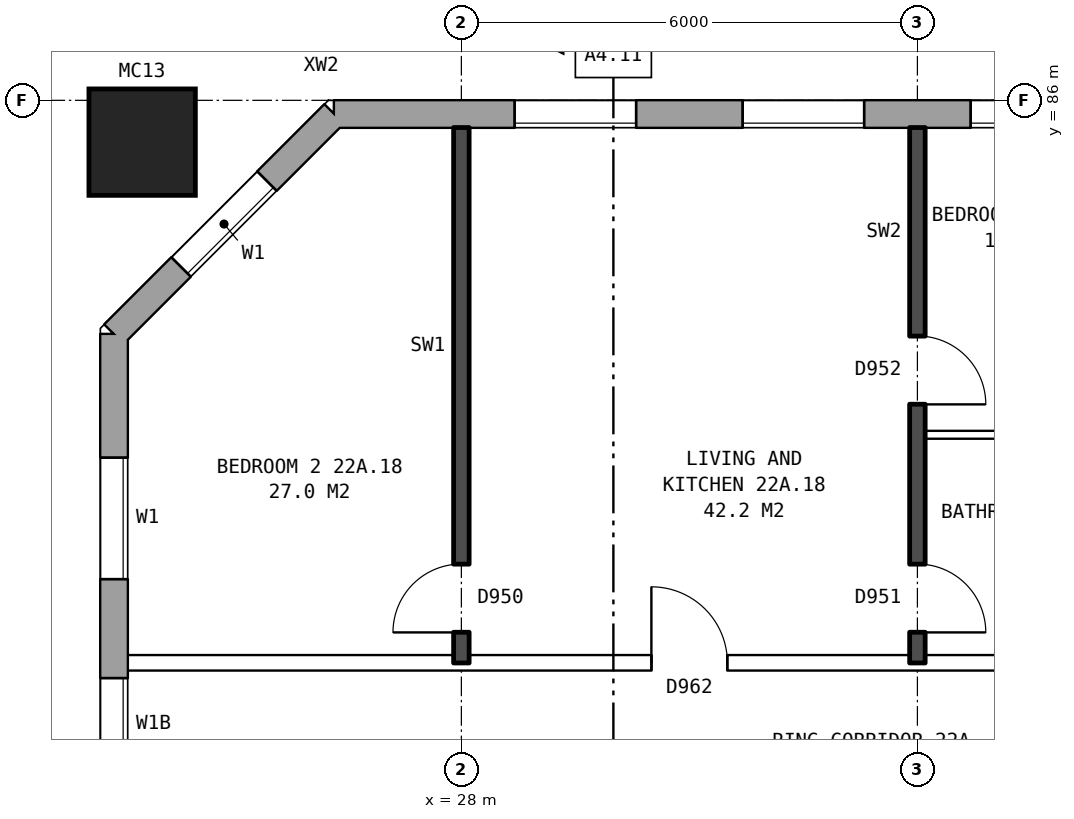
"""IFC4 building model, lengths in metres.
Left out: names, types, materials, properties, quantities, classifications, styles, units other than length and angle.
Written with IfcOpenShell. Run it as: python <this file> out.ifc"""

import sys

from ifc_helpers import new_model, si_unit, direction, frame, frame_2d, origin, origin_2d, place, context, subcontext, project, spatial, rectangle, hollow_rectangle, extrude, element, fill, save


model = new_model("IFC4")
c1 = context("Model", 3, precision=1e-05, world=origin(), true_north=direction((0.0, 1.0)))
c2 = subcontext(c1, "Body", "Model", "MODEL_VIEW")
j1 = project(units=[si_unit("LENGTHUNIT", "METRE"), si_unit("PLANEANGLEUNIT", "RADIAN")], contexts=[c1])
p1 = place(None, origin())
s1 = spatial("IfcSite", under=j1, at=p1, CompositionType="ELEMENT")
p2 = place(p1, origin())
s2 = spatial("IfcBuilding", under=s1, at=p2, CompositionType="ELEMENT")
p3 = place(p2, frame((0.0, 0.0, 80.9)))
s3 = spatial("IfcBuildingStorey", under=s2, at=p3, CompositionType="ELEMENT", Elevation=80.9)
p4 = place(p3, frame((23.8, 85.45, 0.0), z_axis=(0.0, 0.0, 1.0), x_axis=(1.0, 0.0, 0.0)))
e1 = element("IfcColumn", 1, at=p4, inside=s3, PredefinedType="COLUMN", context=c2, shape_type="SweptSolid", body=[
    extrude(hollow_rectangle(XDim=1.4, YDim=1.4, WallThickness=0.075, at=origin_2d()), origin(), (0.0, 0.0, 1.0), 3.1),
])
p5 = place(p3, frame((72.925, 85.82, 0.0), z_axis=(0.0, 0.0, 1.0), x_axis=(-1.0, 0.0, 0.0)))
e2 = element("IfcWall", 2, at=p5, inside=s3, PredefinedType="STANDARD", context=c2, shape_type="SweptSolid", body=[
    extrude(rectangle(XDim=46.601, YDim=0.36, at=frame_2d((23.3, 0.0))), origin(), (0.0, 0.0, 1.0), 2.85),
])
p6 = place(p5, frame((0.625, 0.0, 0.8)))
e3 = element("IfcOpeningElement", 3, at=p6, cuts=e2, PredefinedType="OPENING", context=c2, shape_type="SweptSolid", body=[
    extrude(rectangle(XDim=1.6, YDim=1.8, at=frame_2d((0.8, 0.9))), frame((0.0, 0.19, 0.0), z_axis=(0.0, -1.0, 0.0), x_axis=(1.0, 0.0, 0.0)), (0.0, 0.0, 1.0), 0.38),
])
p7 = place(p5, frame((3.625, 0.0, 0.8)))
e4 = element("IfcOpeningElement", 4, at=p7, cuts=e2, PredefinedType="OPENING", context=c2, shape_type="SweptSolid", body=[
    extrude(rectangle(XDim=1.6, YDim=1.8, at=frame_2d((0.8, 0.9))), frame((0.0, 0.19, 0.0), z_axis=(0.0, -1.0, 0.0), x_axis=(1.0, 0.0, 0.0)), (0.0, 0.0, 1.0), 0.38),
])
p8 = place(p5, frame((6.625, 0.0, 0.8)))
e5 = element("IfcOpeningElement", 5, at=p8, cuts=e2, PredefinedType="OPENING", context=c2, shape_type="SweptSolid", body=[
    extrude(rectangle(XDim=1.6, YDim=1.8, at=frame_2d((0.8, 0.9))), frame((0.0, 0.19, 0.0), z_axis=(0.0, -1.0, 0.0), x_axis=(1.0, 0.0, 0.0)), (0.0, 0.0, 1.0), 0.38),
])
p9 = place(p5, frame((9.625, 0.0, 0.8)))
e6 = element("IfcOpeningElement", 6, at=p9, cuts=e2, PredefinedType="OPENING", context=c2, shape_type="SweptSolid", body=[
    extrude(rectangle(XDim=1.6, YDim=1.8, at=frame_2d((0.8, 0.9))), frame((0.0, 0.19, 0.0), z_axis=(0.0, -1.0, 0.0), x_axis=(1.0, 0.0, 0.0)), (0.0, 0.0, 1.0), 0.38),
])
p10 = place(p5, frame((12.075, 0.0, 0.8)))
e7 = element("IfcOpeningElement", 7, at=p10, cuts=e2, PredefinedType="OPENING", context=c2, shape_type="SweptSolid", body=[
    extrude(rectangle(XDim=1.0, YDim=1.8, at=frame_2d((0.5, 0.9))), frame((0.0, 0.19, 0.0), z_axis=(0.0, -1.0, 0.0), x_axis=(1.0, 0.0, 0.0)), (0.0, 0.0, 1.0), 0.38),
])
p11 = place(p5, frame((15.325, 0.0, 0.65)))
e8 = element("IfcOpeningElement", 8, at=p11, cuts=e2, PredefinedType="OPENING", context=c2, shape_type="SweptSolid", body=[
    extrude(rectangle(XDim=0.6, YDim=0.9, at=frame_2d((0.3, 0.45))), frame((0.0, 0.19, 0.0), z_axis=(0.0, -1.0, 0.0), x_axis=(1.0, 0.0, 0.0)), (0.0, 0.0, 1.0), 0.38),
])
p12 = place(p5, frame((18.625, 0.0, 0.8)))
e9 = element("IfcOpeningElement", 9, at=p12, cuts=e2, PredefinedType="OPENING", context=c2, shape_type="SweptSolid", body=[
    extrude(rectangle(XDim=1.6, YDim=1.8, at=frame_2d((0.8, 0.9))), frame((0.0, 0.19, 0.0), z_axis=(0.0, -1.0, 0.0), x_axis=(1.0, 0.0, 0.0)), (0.0, 0.0, 1.0), 0.38),
])
p13 = place(p5, frame((21.625, 0.0, 0.8)))
e10 = element("IfcOpeningElement", 10, at=p13, cuts=e2, PredefinedType="OPENING", context=c2, shape_type="SweptSolid", body=[
    extrude(rectangle(XDim=1.6, YDim=1.8, at=frame_2d((0.8, 0.9))), frame((0.0, 0.19, 0.0), z_axis=(0.0, -1.0, 0.0), x_axis=(1.0, 0.0, 0.0)), (0.0, 0.0, 1.0), 0.38),
])
p14 = place(p5, frame((24.625, 0.0, 0.8)))
e11 = element("IfcOpeningElement", 11, at=p14, cuts=e2, PredefinedType="OPENING", context=c2, shape_type="SweptSolid", body=[
    extrude(rectangle(XDim=1.6, YDim=1.8, at=frame_2d((0.8, 0.9))), frame((0.0, 0.19, 0.0), z_axis=(0.0, -1.0, 0.0), x_axis=(1.0, 0.0, 0.0)), (0.0, 0.0, 1.0), 0.38),
])
p15 = place(p5, frame((27.625, 0.0, 0.8)))
e12 = element("IfcOpeningElement", 12, at=p15, cuts=e2, PredefinedType="OPENING", context=c2, shape_type="SweptSolid", body=[
    extrude(rectangle(XDim=1.6, YDim=1.8, at=frame_2d((0.8, 0.9))), frame((0.0, 0.19, 0.0), z_axis=(0.0, -1.0, 0.0), x_axis=(1.0, 0.0, 0.0)), (0.0, 0.0, 1.0), 0.38),
])
p16 = place(p5, frame((29.525, 0.0, 0.8)))
e13 = element("IfcOpeningElement", 13, at=p16, cuts=e2, PredefinedType="OPENING", context=c2, shape_type="SweptSolid", body=[
    extrude(rectangle(XDim=1.2, YDim=1.2, at=frame_2d((0.6, 0.6))), frame((0.0, 0.19, 0.0), z_axis=(0.0, -1.0, 0.0), x_axis=(1.0, 0.0, 0.0)), (0.0, 0.0, 1.0), 0.38),
])
p17 = place(p5, frame((33.625, 0.0, 0.8)))
e14 = element("IfcOpeningElement", 14, at=p17, cuts=e2, PredefinedType="OPENING", context=c2, shape_type="SweptSolid", body=[
    extrude(rectangle(XDim=1.6, YDim=1.8, at=frame_2d((0.8, 0.9))), frame((0.0, 0.19, 0.0), z_axis=(0.0, -1.0, 0.0), x_axis=(1.0, 0.0, 0.0)), (0.0, 0.0, 1.0), 0.38),
])
p18 = place(p5, frame((36.625, 0.0, 0.8)))
e15 = element("IfcOpeningElement", 15, at=p18, cuts=e2, PredefinedType="OPENING", context=c2, shape_type="SweptSolid", body=[
    extrude(rectangle(XDim=1.6, YDim=1.8, at=frame_2d((0.8, 0.9))), frame((0.0, 0.19, 0.0), z_axis=(0.0, -1.0, 0.0), x_axis=(1.0, 0.0, 0.0)), (0.0, 0.0, 1.0), 0.38),
])
p19 = place(p5, frame((39.625, 0.0, 0.8)))
e16 = element("IfcOpeningElement", 16, at=p19, cuts=e2, PredefinedType="OPENING", context=c2, shape_type="SweptSolid", body=[
    extrude(rectangle(XDim=1.6, YDim=1.8, at=frame_2d((0.8, 0.9))), frame((0.0, 0.19, 0.0), z_axis=(0.0, -1.0, 0.0), x_axis=(1.0, 0.0, 0.0)), (0.0, 0.0, 1.0), 0.38),
])
p20 = place(p5, frame((42.625, 0.0, 0.8)))
e17 = element("IfcOpeningElement", 17, at=p20, cuts=e2, PredefinedType="OPENING", context=c2, shape_type="SweptSolid", body=[
    extrude(rectangle(XDim=1.6, YDim=1.8, at=frame_2d((0.8, 0.9))), frame((0.0, 0.19, 0.0), z_axis=(0.0, -1.0, 0.0), x_axis=(1.0, 0.0, 0.0)), (0.0, 0.0, 1.0), 0.38),
])
p21 = place(p5, frame((13.375, 0.0, 1.7)))
e18 = element("IfcOpeningElement", 18, at=p21, cuts=e2, PredefinedType="OPENING", context=c2, shape_type="SweptSolid", body=[
    extrude(rectangle(XDim=0.8, YDim=0.9, at=frame_2d((0.4, 0.45))), frame((0.0, 0.19, 0.0), z_axis=(0.0, -1.0, 0.0), x_axis=(1.0, 0.0, 0.0)), (0.0, 0.0, 1.0), 0.38),
])
p22 = place(p5, frame((16.375, 0.0, 0.65)))
e19 = element("IfcOpeningElement", 19, at=p22, cuts=e2, PredefinedType="OPENING", context=c2, shape_type="SweptSolid", body=[
    extrude(rectangle(XDim=1.4, YDim=1.8, at=frame_2d((0.7, 0.9))), frame((0.0, 0.19, 0.0), z_axis=(0.0, -1.0, 0.0), x_axis=(1.0, 0.0, 0.0)), (0.0, 0.0, 1.0), 0.38),
])
p23 = place(p3, frame((26.325, 85.82, 0.0), z_axis=(0.0, 0.0, 1.0), x_axis=(-0.707106781187, -0.707106781187, 0.0)))
e20 = element("IfcWall", 20, at=p23, inside=s3, PredefinedType="STANDARD", context=c2, shape_type="SweptSolid", body=[
    extrude(rectangle(XDim=4.094, YDim=0.36, at=frame_2d((2.047, 0.0))), origin(), (0.0, 0.0, 1.0), 2.85),
])
p24 = place(p23, frame((1.247, 0.0, 0.8)))
e21 = element("IfcOpeningElement", 21, at=p24, cuts=e20, PredefinedType="OPENING", context=c2, shape_type="SweptSolid", body=[
    extrude(rectangle(XDim=1.6, YDim=1.8, at=frame_2d((0.8, 0.9))), frame((0.0, 0.19, 0.0), z_axis=(0.0, -1.0, 0.0), x_axis=(1.0, 0.0, 0.0)), (0.0, 0.0, 1.0), 0.38),
])
p25 = place(p3, frame((23.43, 82.925, 0.0), z_axis=(0.0, 0.0, 1.0), x_axis=(0.0, -1.0, 0.0)))
e22 = element("IfcWall", 22, at=p25, inside=s3, PredefinedType="STANDARD", context=c2, shape_type="SweptSolid", body=[
    extrude(rectangle(XDim=25.851, YDim=0.36, at=frame_2d((12.925, 0.0))), origin(), (0.0, 0.0, 1.0), 2.85),
])
p26 = place(p25, frame((1.625, 0.0, 0.8)))
e23 = element("IfcOpeningElement", 23, at=p26, cuts=e22, PredefinedType="OPENING", context=c2, shape_type="SweptSolid", body=[
    extrude(rectangle(XDim=1.6, YDim=1.8, at=frame_2d((0.8, 0.9))), frame((0.0, 0.19, 0.0), z_axis=(0.0, -1.0, 0.0), x_axis=(1.0, 0.0, 0.0)), (0.0, 0.0, 1.0), 0.38),
])
p27 = place(p25, frame((4.525, 0.0, 0.8)))
e24 = element("IfcOpeningElement", 24, at=p27, cuts=e22, PredefinedType="OPENING", context=c2, shape_type="SweptSolid", body=[
    extrude(rectangle(XDim=1.2, YDim=1.8, at=frame_2d((0.6, 0.9))), frame((0.0, 0.19, 0.0), z_axis=(0.0, -1.0, 0.0), x_axis=(1.0, 0.0, 0.0)), (0.0, 0.0, 1.0), 0.38),
])
p28 = place(p25, frame((6.025, 0.0, 0.8)))
e25 = element("IfcOpeningElement", 25, at=p28, cuts=e22, PredefinedType="OPENING", context=c2, shape_type="SweptSolid", body=[
    extrude(rectangle(XDim=1.0, YDim=0.9, at=frame_2d((0.5, 0.45))), frame((0.0, 0.19, 0.0), z_axis=(0.0, -1.0, 0.0), x_axis=(1.0, 0.0, 0.0)), (0.0, 0.0, 1.0), 0.38),
])
p29 = place(p25, frame((10.625, 0.0, 0.8)))
e26 = element("IfcOpeningElement", 26, at=p29, cuts=e22, PredefinedType="OPENING", context=c2, shape_type="SweptSolid", body=[
    extrude(rectangle(XDim=1.6, YDim=1.8, at=frame_2d((0.8, 0.9))), frame((0.0, 0.19, 0.0), z_axis=(0.0, -1.0, 0.0), x_axis=(1.0, 0.0, 0.0)), (0.0, 0.0, 1.0), 0.38),
])
p30 = place(p25, frame((13.625, 0.0, 0.8)))
e27 = element("IfcOpeningElement", 27, at=p30, cuts=e22, PredefinedType="OPENING", context=c2, shape_type="SweptSolid", body=[
    extrude(rectangle(XDim=1.6, YDim=1.8, at=frame_2d((0.8, 0.9))), frame((0.0, 0.19, 0.0), z_axis=(0.0, -1.0, 0.0), x_axis=(1.0, 0.0, 0.0)), (0.0, 0.0, 1.0), 0.38),
])
p31 = place(p25, frame((8.075, 0.0, 1.7)))
e28 = element("IfcOpeningElement", 28, at=p31, cuts=e22, PredefinedType="OPENING", context=c2, shape_type="SweptSolid", body=[
    extrude(rectangle(XDim=0.8, YDim=0.9, at=frame_2d((0.4, 0.45))), frame((0.0, 0.19, 0.0), z_axis=(0.0, -1.0, 0.0), x_axis=(1.0, 0.0, 0.0)), (0.0, 0.0, 1.0), 0.38),
])
p32 = place(p25, frame((9.325, 0.0, 0.8)))
e29 = element("IfcOpeningElement", 29, at=p32, cuts=e22, PredefinedType="OPENING", context=c2, shape_type="SweptSolid", body=[
    extrude(rectangle(XDim=1.0, YDim=1.8, at=frame_2d((0.5, 0.9))), frame((0.0, 0.19, 0.0), z_axis=(0.0, -1.0, 0.0), x_axis=(1.0, 0.0, 0.0)), (0.0, 0.0, 1.0), 0.38),
])
p33 = place(p25, frame((22.625, 0.0, 0.8)))
e30 = element("IfcOpeningElement", 30, at=p33, cuts=e22, PredefinedType="OPENING", context=c2, shape_type="SweptSolid", body=[
    extrude(rectangle(XDim=1.6, YDim=1.8, at=frame_2d((0.8, 0.9))), frame((0.0, 0.19, 0.0), z_axis=(0.0, -1.0, 0.0), x_axis=(1.0, 0.0, 0.0)), (0.0, 0.0, 1.0), 0.38),
])
p34 = place(p25, frame((12.525, 0.0, 0.8)))
e31 = element("IfcOpeningElement", 31, at=p34, cuts=e22, PredefinedType="OPENING", context=c2, shape_type="SweptSolid", body=[
    extrude(rectangle(XDim=0.8, YDim=1.8, at=frame_2d((0.4, 0.9))), frame((0.0, 0.19, 0.0), z_axis=(0.0, -1.0, 0.0), x_axis=(1.0, 0.0, 0.0)), (0.0, 0.0, 1.0), 0.38),
])
p35 = place(p25, frame((15.525, 0.0, 0.8)))
e32 = element("IfcOpeningElement", 32, at=p35, cuts=e22, PredefinedType="OPENING", context=c2, shape_type="SweptSolid", body=[
    extrude(rectangle(XDim=1.0, YDim=1.8, at=frame_2d((0.5, 0.9))), frame((0.0, 0.19, 0.0), z_axis=(0.0, -1.0, 0.0), x_axis=(1.0, 0.0, 0.0)), (0.0, 0.0, 1.0), 0.38),
])
p36 = place(p25, frame((16.825, 0.0, 1.6)))
e33 = element("IfcOpeningElement", 33, at=p36, cuts=e22, PredefinedType="OPENING", context=c2, shape_type="SweptSolid", body=[
    extrude(rectangle(XDim=0.8, YDim=0.9, at=frame_2d((0.4, 0.45))), frame((0.0, 0.19, 0.0), z_axis=(0.0, -1.0, 0.0), x_axis=(1.0, 0.0, 0.0)), (0.0, 0.0, 1.0), 0.38),
])
p37 = place(p25, frame((18.825, 0.0, 0.8)))
e34 = element("IfcOpeningElement", 34, at=p37, cuts=e22, PredefinedType="OPENING", context=c2, shape_type="SweptSolid", body=[
    extrude(rectangle(XDim=1.0, YDim=0.9, at=frame_2d((0.5, 0.45))), frame((0.0, 0.19, 0.0), z_axis=(0.0, -1.0, 0.0), x_axis=(1.0, 0.0, 0.0)), (0.0, 0.0, 1.0), 0.38),
])
p38 = place(p25, frame((20.125, 0.0, 0.8)))
e35 = element("IfcOpeningElement", 35, at=p38, cuts=e22, PredefinedType="OPENING", context=c2, shape_type="SweptSolid", body=[
    extrude(rectangle(XDim=1.2, YDim=1.8, at=frame_2d((0.6, 0.9))), frame((0.0, 0.19, 0.0), z_axis=(0.0, -1.0, 0.0), x_axis=(1.0, 0.0, 0.0)), (0.0, 0.0, 1.0), 0.38),
])
p39 = place(p3, frame((23.61, 78.6, 0.0), z_axis=(0.0, 0.0, 1.0), x_axis=(1.0, 0.0, 0.0)))
e36 = element("IfcWall", 36, at=p39, inside=s3, PredefinedType="PARTITIONING", context=c2, shape_type="SweptSolid", body=[
    extrude(rectangle(XDim=22.29, YDim=0.2, at=frame_2d((11.145, 0.0))), origin(), (0.0, 0.0, 1.0), 2.85),
])
p40 = place(p39, frame((18.84, 0.0, 0.0)))
e37 = element("IfcOpeningElement", 37, at=p40, cuts=e36, PredefinedType="OPENING", context=c2, shape_type="SweptSolid", body=[
    extrude(rectangle(XDim=1.0, YDim=2.1, at=frame_2d((0.5, 1.05))), frame((0.0, 0.11, 0.0), z_axis=(0.0, -1.0, 0.0), x_axis=(1.0, 0.0, 0.0)), (0.0, 0.0, 1.0), 0.22),
])
p41 = place(p39, frame((6.89, 0.0, 0.0)))
e38 = element("IfcOpeningElement", 38, at=p41, cuts=e36, PredefinedType="OPENING", context=c2, shape_type="SweptSolid", body=[
    extrude(rectangle(XDim=1.0, YDim=2.1, at=frame_2d((0.5, 1.05))), frame((0.0, 0.11, 0.0), z_axis=(0.0, -1.0, 0.0), x_axis=(1.0, 0.0, 0.0)), (0.0, 0.0, 1.0), 0.22),
])
p42 = place(p3, frame((34.1, 81.6, 0.0), z_axis=(0.0, 0.0, 1.0), x_axis=(1.0, 0.0, 0.0)))
e39 = element("IfcWall", 39, at=p42, inside=s3, PredefinedType="PARTITIONING", context=c2, shape_type="SweptSolid", body=[
    extrude(rectangle(XDim=2.8, YDim=0.1, at=frame_2d((1.4, 0.0))), origin(), (0.0, 0.0, 1.0), 2.85),
])
p43 = place(p3, frame((28.0, 78.6, 0.0), z_axis=(0.0, 0.0, 1.0), x_axis=(0.0, 1.0, 0.0)))
e40 = element("IfcWall", 40, at=p43, inside=s3, PredefinedType="SOLIDWALL", context=c2, shape_type="SweptSolid", body=[
    extrude(rectangle(XDim=7.04, YDim=0.2, at=frame_2d((3.52, 0.0))), origin(), (0.0, 0.0, 1.0), 2.85),
])
p44 = place(p43, frame((0.4, 0.0, 0.0)))
e41 = element("IfcOpeningElement", 41, at=p44, cuts=e40, PredefinedType="OPENING", context=c2, shape_type="SweptSolid", body=[
    extrude(rectangle(XDim=0.9, YDim=2.1, at=frame_2d((0.45, 1.05))), frame((0.0, 0.11, 0.0), z_axis=(0.0, -1.0, 0.0), x_axis=(1.0, 0.0, 0.0)), (0.0, 0.0, 1.0), 0.22),
])
p45 = place(p3, frame((34.0, 78.6, 0.0), z_axis=(0.0, 0.0, 1.0), x_axis=(0.0, 1.0, 0.0)))
e42 = element("IfcWall", 42, at=p45, inside=s3, PredefinedType="SOLIDWALL", context=c2, shape_type="SweptSolid", body=[
    extrude(rectangle(XDim=7.04, YDim=0.2, at=frame_2d((3.52, 0.0))), origin(), (0.0, 0.0, 1.0), 2.85),
])
p46 = place(p45, frame((3.4, 0.0, 0.0)))
e43 = element("IfcOpeningElement", 43, at=p46, cuts=e42, PredefinedType="OPENING", context=c2, shape_type="SweptSolid", body=[
    extrude(rectangle(XDim=0.9, YDim=2.1, at=frame_2d((0.45, 1.05))), frame((0.0, 0.11, 0.0), z_axis=(0.0, -1.0, 0.0), x_axis=(1.0, 0.0, 0.0)), (0.0, 0.0, 1.0), 0.22),
])
p47 = place(p45, frame((0.4, 0.0, 0.0)))
e44 = element("IfcOpeningElement", 44, at=p47, cuts=e42, PredefinedType="OPENING", context=c2, shape_type="SweptSolid", body=[
    extrude(rectangle(XDim=0.9, YDim=2.1, at=frame_2d((0.45, 1.05))), frame((0.0, 0.11, 0.0), z_axis=(0.0, -1.0, 0.0), x_axis=(1.0, 0.0, 0.0)), (0.0, 0.0, 1.0), 0.22),
])
p48 = place(p18, origin())
e45 = element("IfcWindow", 45, at=p48, inside=s3, PartitioningType="SINGLE_PANEL", PredefinedType="WINDOW", context=c2, shape_type="SweptSolid", body=[
    extrude(rectangle(XDim=1.6, YDim=1.8, at=frame_2d((0.8, 0.9))), frame((0.0, 0.15, 0.0), z_axis=(0.0, -1.0, 0.0), x_axis=(1.0, 0.0, 0.0)), (0.0, 0.0, 1.0), 0.06),
])
fill(e15, e45)
p49 = place(p19, origin())
e46 = element("IfcWindow", 46, at=p49, inside=s3, PartitioningType="SINGLE_PANEL", PredefinedType="WINDOW", context=c2, shape_type="SweptSolid", body=[
    extrude(rectangle(XDim=1.6, YDim=1.8, at=frame_2d((0.8, 0.9))), frame((0.0, 0.15, 0.0), z_axis=(0.0, -1.0, 0.0), x_axis=(1.0, 0.0, 0.0)), (0.0, 0.0, 1.0), 0.06),
])
fill(e16, e46)
p50 = place(p20, origin())
e47 = element("IfcWindow", 47, at=p50, inside=s3, PartitioningType="SINGLE_PANEL", PredefinedType="WINDOW", context=c2, shape_type="SweptSolid", body=[
    extrude(rectangle(XDim=1.6, YDim=1.8, at=frame_2d((0.8, 0.9))), frame((0.0, 0.15, 0.0), z_axis=(0.0, -1.0, 0.0), x_axis=(1.0, 0.0, 0.0)), (0.0, 0.0, 1.0), 0.06),
])
fill(e17, e47)
p51 = place(p24, origin())
e48 = element("IfcWindow", 48, at=p51, inside=s3, PartitioningType="SINGLE_PANEL", PredefinedType="WINDOW", context=c2, shape_type="SweptSolid", body=[
    extrude(rectangle(XDim=1.6, YDim=1.8, at=frame_2d((0.8, 0.9))), frame((0.0, 0.15, 0.0), z_axis=(0.0, -1.0, 0.0), x_axis=(1.0, 0.0, 0.0)), (0.0, 0.0, 1.0), 0.06),
])
fill(e21, e48)
p52 = place(p26, origin())
e49 = element("IfcWindow", 49, at=p52, inside=s3, PartitioningType="SINGLE_PANEL", PredefinedType="WINDOW", context=c2, shape_type="SweptSolid", body=[
    extrude(rectangle(XDim=1.6, YDim=1.8, at=frame_2d((0.8, 0.9))), frame((0.0, 0.15, 0.0), z_axis=(0.0, -1.0, 0.0), x_axis=(1.0, 0.0, 0.0)), (0.0, 0.0, 1.0), 0.06),
])
fill(e23, e49)
p53 = place(p27, origin())
e50 = element("IfcWindow", 50, at=p53, inside=s3, PartitioningType="SINGLE_PANEL", PredefinedType="WINDOW", context=c2, shape_type="SweptSolid", body=[
    extrude(rectangle(XDim=1.2, YDim=1.8, at=frame_2d((0.6, 0.9))), frame((0.0, 0.15, 0.0), z_axis=(0.0, -1.0, 0.0), x_axis=(1.0, 0.0, 0.0)), (0.0, 0.0, 1.0), 0.06),
])
fill(e24, e50)
p54 = place(p46, frame((0.9, 0.0, 0.0), z_axis=(0.0, 0.0, 1.0), x_axis=(-1.0, 0.0, 0.0)))
e51 = element("IfcDoor", 51, at=p54, inside=s3, OperationType="SINGLE_SWING_RIGHT", PredefinedType="DOOR", context=c2, shape_type="SweptSolid", body=[
    extrude(rectangle(XDim=0.9, YDim=2.1, at=frame_2d((0.45, 1.05))), frame((0.0, 0.025, 0.0), z_axis=(0.0, -1.0, 0.0), x_axis=(1.0, 0.0, 0.0)), (0.0, 0.0, 1.0), 0.05),
])
fill(e43, e51)
p55 = place(p44, origin())
e52 = element("IfcDoor", 52, at=p55, inside=s3, OperationType="SINGLE_SWING_LEFT", PredefinedType="DOOR", context=c2, shape_type="SweptSolid", body=[
    extrude(rectangle(XDim=0.9, YDim=2.1, at=frame_2d((0.45, 1.05))), frame((0.0, 0.025, 0.0), z_axis=(0.0, -1.0, 0.0), x_axis=(1.0, 0.0, 0.0)), (0.0, 0.0, 1.0), 0.05),
])
fill(e41, e52)
p56 = place(p41, origin())
e53 = element("IfcDoor", 53, at=p56, inside=s3, OperationType="SINGLE_SWING_LEFT", PredefinedType="DOOR", context=c2, shape_type="SweptSolid", body=[
    extrude(rectangle(XDim=1.0, YDim=2.1, at=frame_2d((0.5, 1.05))), frame((0.0, 0.025, 0.0), z_axis=(0.0, -1.0, 0.0), x_axis=(1.0, 0.0, 0.0)), (0.0, 0.0, 1.0), 0.05),
])
fill(e38, e53)
p57 = place(p47, frame((0.9, 0.0, 0.0), z_axis=(0.0, 0.0, 1.0), x_axis=(-1.0, 0.0, 0.0)))
e54 = element("IfcDoor", 54, at=p57, inside=s3, OperationType="SINGLE_SWING_RIGHT", PredefinedType="DOOR", context=c2, shape_type="SweptSolid", body=[
    extrude(rectangle(XDim=0.9, YDim=2.1, at=frame_2d((0.45, 1.05))), frame((0.0, 0.025, 0.0), z_axis=(0.0, -1.0, 0.0), x_axis=(1.0, 0.0, 0.0)), (0.0, 0.0, 1.0), 0.05),
])
fill(e44, e54)
save(model, sys.argv[1])
